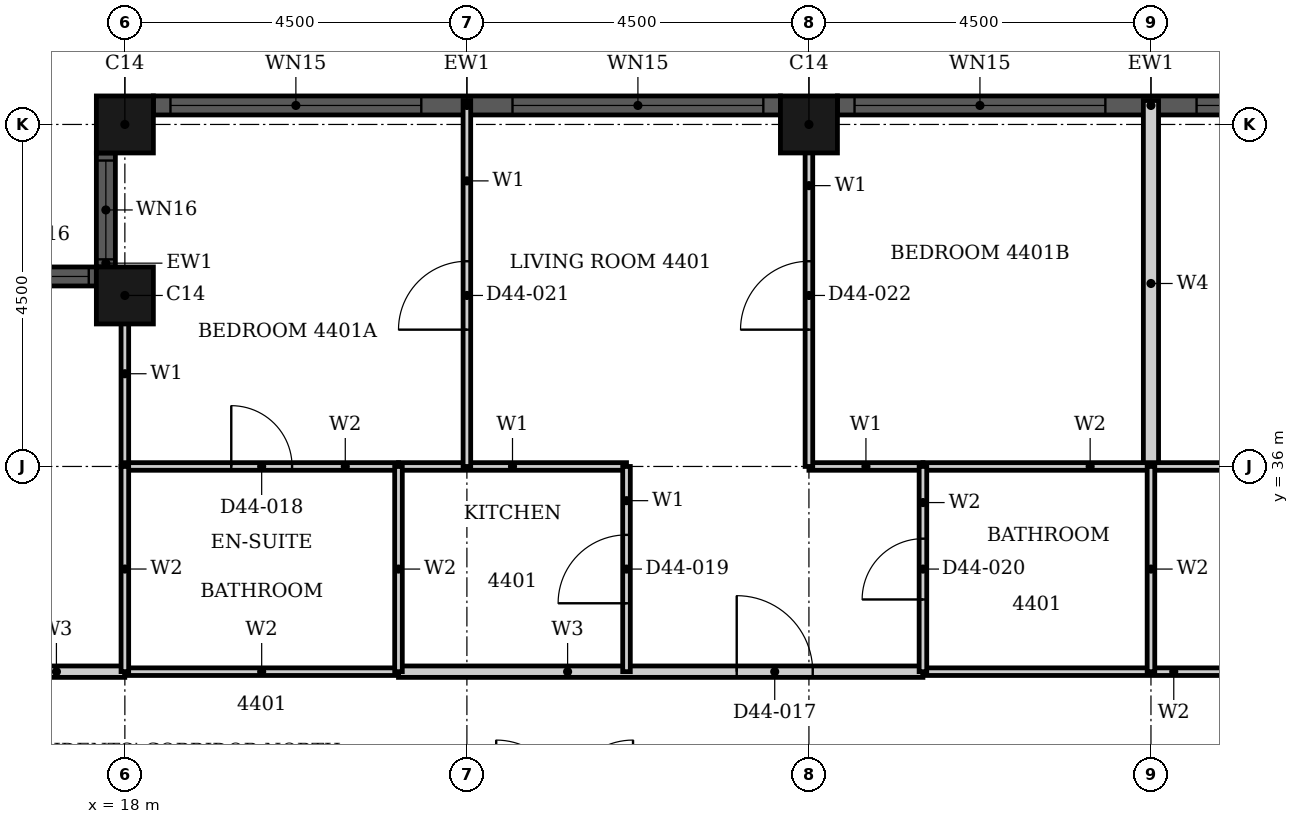
"""IFC4 building model, lengths in metres.
Left out: names, types, materials, properties, quantities, classifications, styles, units other than length and angle.
Written with IfcOpenShell. Run it as: python <this file> out.ifc"""

import sys

from ifc_helpers import new_model, si_unit, direction, frame, frame_2d, origin, origin_2d, place, context, subcontext, project, spatial, rectangle, hollow_rectangle, extrude, element, fill, save


model = new_model("IFC4")
c1 = context("Model", 3, precision=1e-05, world=origin(), true_north=direction((0.0, 1.0)))
c2 = subcontext(c1, "Body", "Model", "MODEL_VIEW")
j1 = project(units=[si_unit("LENGTHUNIT", "METRE"), si_unit("PLANEANGLEUNIT", "RADIAN")], contexts=[c1])
p1 = place(None, origin())
s1 = spatial("IfcSite", under=j1, at=p1, CompositionType="ELEMENT")
p2 = place(p1, origin())
s2 = spatial("IfcBuilding", under=s1, at=p2, CompositionType="ELEMENT")
p3 = place(p2, frame((0.0, 0.0, 176.5)))
s3 = spatial("IfcBuildingStorey", under=s2, at=p3, CompositionType="ELEMENT", Elevation=176.5)
for number, where, z_axis, x_axis in (
    (1, (27.0, 40.5, 0.0), (0.0, 0.0, 1.0), (1.0, 0.0, 0.0)),
    (2, (18.0, 40.5, 0.0), (0.0, 0.0, 1.0), (1.0, 0.0, 0.0)),
    (3, (18.0, 38.25, 0.0), (0.0, 0.0, 1.0), (1.0, 0.0, 0.0)),
):
    element("IfcColumn", number, at=place(p3, frame(where, z_axis=z_axis, x_axis=x_axis)), inside=s3, PredefinedType="COLUMN", context=c2, shape_type="SweptSolid", body=[
        extrude(hollow_rectangle(XDim=0.75, YDim=0.75, WallThickness=0.024, at=origin_2d()), origin(), (0.0, 0.0, 1.0), 3.7),
    ])
p4 = place(p3, frame((35.625, 40.75, 0.0), z_axis=(0.0, 0.0, 1.0), x_axis=(-1.0, 0.0, 0.0)))
e4 = element("IfcWall", 4, at=p4, inside=s3, PredefinedType="SOLIDWALL", context=c2, shape_type="SweptSolid", body=[
    extrude(rectangle(XDim=8.25, YDim=0.25, at=frame_2d((4.125, 0.0))), origin(), (0.0, 0.0, 1.0), 3.7),
])
p5 = place(p4, frame((0.225, 0.0, 0.45)))
e5 = element("IfcOpeningElement", 5, at=p5, cuts=e4, PredefinedType="OPENING", context=c2, shape_type="SweptSolid", body=[
    extrude(rectangle(XDim=3.3, YDim=2.3, at=frame_2d((1.65, 1.15))), frame((0.0, 0.135, 0.0), z_axis=(0.0, -1.0, 0.0), x_axis=(1.0, 0.0, 0.0)), (0.0, 0.0, 1.0), 0.27),
])
p6 = place(p4, frame((4.725, 0.0, 0.45)))
e6 = element("IfcOpeningElement", 6, at=p6, cuts=e4, PredefinedType="OPENING", context=c2, shape_type="SweptSolid", body=[
    extrude(rectangle(XDim=3.3, YDim=2.3, at=frame_2d((1.65, 1.15))), frame((0.0, 0.135, 0.0), z_axis=(0.0, -1.0, 0.0), x_axis=(1.0, 0.0, 0.0)), (0.0, 0.0, 1.0), 0.27),
])
p7 = place(p3, frame((26.625, 40.75, 0.0), z_axis=(0.0, 0.0, 1.0), x_axis=(-1.0, 0.0, 0.0)))
e7 = element("IfcWall", 7, at=p7, inside=s3, PredefinedType="SOLIDWALL", context=c2, shape_type="SweptSolid", body=[
    extrude(rectangle(XDim=8.25, YDim=0.25, at=frame_2d((4.125, 0.0))), origin(), (0.0, 0.0, 1.0), 3.7),
])
p8 = place(p7, frame((0.225, 0.0, 0.45)))
e8 = element("IfcOpeningElement", 8, at=p8, cuts=e7, PredefinedType="OPENING", context=c2, shape_type="SweptSolid", body=[
    extrude(rectangle(XDim=3.3, YDim=2.3, at=frame_2d((1.65, 1.15))), frame((0.0, 0.135, 0.0), z_axis=(0.0, -1.0, 0.0), x_axis=(1.0, 0.0, 0.0)), (0.0, 0.0, 1.0), 0.27),
])
p9 = place(p7, frame((4.725, 0.0, 0.45)))
e9 = element("IfcOpeningElement", 9, at=p9, cuts=e7, PredefinedType="OPENING", context=c2, shape_type="SweptSolid", body=[
    extrude(rectangle(XDim=3.3, YDim=2.3, at=frame_2d((1.65, 1.15))), frame((0.0, 0.135, 0.0), z_axis=(0.0, -1.0, 0.0), x_axis=(1.0, 0.0, 0.0)), (0.0, 0.0, 1.0), 0.27),
])
p10 = place(p3, frame((17.75, 40.125, 0.0), z_axis=(0.0, 0.0, 1.0), x_axis=(0.0, -1.0, 0.0)))
e10 = element("IfcWall", 10, at=p10, inside=s3, PredefinedType="SOLIDWALL", context=c2, shape_type="SweptSolid", body=[
    extrude(rectangle(XDim=1.5, YDim=0.25, at=frame_2d((0.75, 0.0))), origin(), (0.0, 0.0, 1.0), 3.7),
])
p11 = place(p10, frame((0.1, 0.0, 0.9)))
e11 = element("IfcOpeningElement", 11, at=p11, cuts=e10, PredefinedType="OPENING", context=c2, shape_type="SweptSolid", body=[
    extrude(rectangle(XDim=1.3, YDim=1.85, at=frame_2d((0.65, 0.925))), frame((0.0, 0.135, 0.0), z_axis=(0.0, -1.0, 0.0), x_axis=(1.0, 0.0, 0.0)), (0.0, 0.0, 1.0), 0.27),
])
p12 = place(p3, frame((17.625, 38.5, 0.0), z_axis=(0.0, 0.0, 1.0), x_axis=(-1.0, 0.0, 0.0)))
e12 = element("IfcWall", 12, at=p12, inside=s3, PredefinedType="SOLIDWALL", context=c2, shape_type="SweptSolid", body=[
    extrude(rectangle(XDim=1.5, YDim=0.25, at=frame_2d((0.75, 0.0))), origin(), (0.0, 0.0, 1.0), 3.7),
])
p13 = place(p12, frame((0.1, 0.0, 0.9)))
e13 = element("IfcOpeningElement", 13, at=p13, cuts=e12, PredefinedType="OPENING", context=c2, shape_type="SweptSolid", body=[
    extrude(rectangle(XDim=1.3, YDim=1.85, at=frame_2d((0.65, 0.925))), frame((0.0, 0.135, 0.0), z_axis=(0.0, -1.0, 0.0), x_axis=(1.0, 0.0, 0.0)), (0.0, 0.0, 1.0), 0.27),
])
p14 = place(p3, frame((21.6, 33.3, 0.0), z_axis=(0.0, 0.0, 1.0), x_axis=(1.0, 0.0, 0.0)))
e14 = element("IfcWall", 14, at=p14, inside=s3, PredefinedType="PARTITIONING", context=c2, shape_type="SweptSolid", body=[
    extrude(rectangle(XDim=6.9, YDim=0.15, at=frame_2d((3.45, 0.0))), origin(), (0.0, 0.0, 1.0), 3.4),
])
p15 = place(p14, frame((4.45, 0.0, 0.0)))
e15 = element("IfcOpeningElement", 15, at=p15, cuts=e14, PredefinedType="OPENING", context=c2, shape_type="SweptSolid", body=[
    extrude(rectangle(XDim=1.0, YDim=2.2, at=frame_2d((0.5, 1.1))), frame((0.0, 0.085, 0.0), z_axis=(0.0, -1.0, 0.0), x_axis=(1.0, 0.0, 0.0)), (0.0, 0.0, 1.0), 0.17),
])
p16 = place(p3, frame((16.2, 33.3, 0.0), z_axis=(0.0, 0.0, 1.0), x_axis=(1.0, 0.0, 0.0)))
e16 = element("IfcWall", 16, at=p16, inside=s3, PredefinedType="PARTITIONING", context=c2, shape_type="SweptSolid", body=[
    extrude(rectangle(XDim=1.799, YDim=0.15, at=frame_2d((0.899, 0.0))), origin(), (0.0, 0.0, 1.0), 3.4),
])
p17 = place(p3, frame((27.0, 36.0, 0.0), z_axis=(0.0, 0.0, 1.0), x_axis=(1.0, 0.0, 0.0)))
e17 = element("IfcWall", 17, at=p17, inside=s3, PredefinedType="PARTITIONING", context=c2, shape_type="SweptSolid", body=[
    extrude(rectangle(XDim=1.5, YDim=0.1, at=frame_2d((0.75, 0.0))), origin(), (0.0, 0.0, 1.0), 3.4),
])
p18 = place(p3, frame((21.6, 36.0, 0.0), z_axis=(0.0, 0.0, 1.0), x_axis=(1.0, 0.0, 0.0)))
e18 = element("IfcWall", 18, at=p18, inside=s3, PredefinedType="PARTITIONING", context=c2, shape_type="SweptSolid", body=[
    extrude(rectangle(XDim=3.0, YDim=0.1, at=frame_2d((1.5, 0.0))), origin(), (0.0, 0.0, 1.0), 3.4),
])
p19 = place(p3, frame((18.0, 36.0, 0.0), z_axis=(0.0, 0.0, 1.0), x_axis=(0.0, 1.0, 0.0)))
e19 = element("IfcWall", 19, at=p19, inside=s3, PredefinedType="PARTITIONING", context=c2, shape_type="SweptSolid", body=[
    extrude(rectangle(XDim=2.44, YDim=0.1, at=frame_2d((1.22, 0.0))), origin(), (0.0, 0.0, 1.0), 3.4),
])
p20 = place(p3, frame((22.5, 36.0, 0.0), z_axis=(0.0, 0.0, 1.0), x_axis=(0.0, 1.0, 0.0)))
e20 = element("IfcWall", 20, at=p20, inside=s3, PredefinedType="PARTITIONING", context=c2, shape_type="SweptSolid", body=[
    extrude(rectangle(XDim=4.815, YDim=0.1, at=frame_2d((2.407, 0.0))), origin(), (0.0, 0.0, 1.0), 3.4),
])
p21 = place(p20, frame((1.8, 0.0, 0.0)))
e21 = element("IfcOpeningElement", 21, at=p21, cuts=e20, PredefinedType="OPENING", context=c2, shape_type="SweptSolid", body=[
    extrude(rectangle(XDim=0.9, YDim=2.1, at=frame_2d((0.45, 1.05))), frame((0.0, 0.06, 0.0), z_axis=(0.0, -1.0, 0.0), x_axis=(1.0, 0.0, 0.0)), (0.0, 0.0, 1.0), 0.12),
])
p22 = place(p3, frame((24.6, 33.3, 0.0), z_axis=(0.0, 0.0, 1.0), x_axis=(0.0, 1.0, 0.0)))
e22 = element("IfcWall", 22, at=p22, inside=s3, PredefinedType="PARTITIONING", context=c2, shape_type="SweptSolid", body=[
    extrude(rectangle(XDim=2.7, YDim=0.1, at=frame_2d((1.35, 0.0))), origin(), (0.0, 0.0, 1.0), 3.4),
])
p23 = place(p22, frame((0.9, 0.0, 0.0)))
e23 = element("IfcOpeningElement", 23, at=p23, cuts=e22, PredefinedType="OPENING", context=c2, shape_type="SweptSolid", body=[
    extrude(rectangle(XDim=0.9, YDim=2.1, at=frame_2d((0.45, 1.05))), frame((0.0, 0.06, 0.0), z_axis=(0.0, -1.0, 0.0), x_axis=(1.0, 0.0, 0.0)), (0.0, 0.0, 1.0), 0.12),
])
p24 = place(p3, frame((27.0, 36.0, 0.0), z_axis=(0.0, 0.0, 1.0), x_axis=(0.0, 1.0, 0.0)))
e24 = element("IfcWall", 24, at=p24, inside=s3, PredefinedType="PARTITIONING", context=c2, shape_type="SweptSolid", body=[
    extrude(rectangle(XDim=4.69, YDim=0.1, at=frame_2d((2.345, 0.0))), origin(), (0.0, 0.0, 1.0), 3.4),
])
p25 = place(p24, frame((1.8, 0.0, 0.0)))
e25 = element("IfcOpeningElement", 25, at=p25, cuts=e24, PredefinedType="OPENING", context=c2, shape_type="SweptSolid", body=[
    extrude(rectangle(XDim=0.9, YDim=2.1, at=frame_2d((0.45, 1.05))), frame((0.0, 0.06, 0.0), z_axis=(0.0, -1.0, 0.0), x_axis=(1.0, 0.0, 0.0)), (0.0, 0.0, 1.0), 0.12),
])
p26 = place(p3, frame((31.5, 36.0, 0.0), z_axis=(0.0, 0.0, 1.0), x_axis=(0.0, 1.0, 0.0)))
e26 = element("IfcWall", 26, at=p26, inside=s3, PredefinedType="PARTITIONING", context=c2, shape_type="SweptSolid", body=[
    extrude(rectangle(XDim=4.815, YDim=0.2, at=frame_2d((2.407, 0.0))), origin(), (0.0, 0.0, 1.0), 3.4),
])
p27 = place(p3, frame((28.5, 33.3, 0.0), z_axis=(0.0, 0.0, 1.0), x_axis=(1.0, 0.0, 0.0)))
e27 = element("IfcWall", 27, at=p27, inside=s3, PredefinedType="PARTITIONING", context=c2, shape_type="SweptSolid", body=[
    extrude(rectangle(XDim=6.6, YDim=0.1, at=frame_2d((3.3, 0.0))), origin(), (0.0, 0.0, 1.0), 3.4),
])
p28 = place(p3, frame((18.0, 33.3, 0.0), z_axis=(0.0, 0.0, 1.0), x_axis=(1.0, 0.0, 0.0)))
e28 = element("IfcWall", 28, at=p28, inside=s3, PredefinedType="PARTITIONING", context=c2, shape_type="SweptSolid", body=[
    extrude(rectangle(XDim=3.6, YDim=0.1, at=frame_2d((1.8, 0.0))), origin(), (0.0, 0.0, 1.0), 3.4),
])
p29 = place(p3, frame((28.5, 36.0, 0.0), z_axis=(0.0, 0.0, 1.0), x_axis=(1.0, 0.0, 0.0)))
e29 = element("IfcWall", 29, at=p29, inside=s3, PredefinedType="PARTITIONING", context=c2, shape_type="SweptSolid", body=[
    extrude(rectangle(XDim=6.6, YDim=0.1, at=frame_2d((3.3, 0.0))), origin(), (0.0, 0.0, 1.0), 3.4),
])
p30 = place(p29, frame((4.4, 0.0, 0.0)))
e30 = element("IfcOpeningElement", 30, at=p30, cuts=e29, PredefinedType="OPENING", context=c2, shape_type="SweptSolid", body=[
    extrude(rectangle(XDim=0.8, YDim=2.1, at=frame_2d((0.4, 1.05))), frame((0.0, 0.06, 0.0), z_axis=(0.0, -1.0, 0.0), x_axis=(1.0, 0.0, 0.0)), (0.0, 0.0, 1.0), 0.12),
])
p31 = place(p3, frame((18.0, 36.0, 0.0), z_axis=(0.0, 0.0, 1.0), x_axis=(1.0, 0.0, 0.0)))
e31 = element("IfcWall", 31, at=p31, inside=s3, PredefinedType="PARTITIONING", context=c2, shape_type="SweptSolid", body=[
    extrude(rectangle(XDim=3.6, YDim=0.1, at=frame_2d((1.8, 0.0))), origin(), (0.0, 0.0, 1.0), 3.4),
])
p32 = place(p31, frame((1.4, 0.0, 0.0)))
e32 = element("IfcOpeningElement", 32, at=p32, cuts=e31, PredefinedType="OPENING", context=c2, shape_type="SweptSolid", body=[
    extrude(rectangle(XDim=0.8, YDim=2.1, at=frame_2d((0.4, 1.05))), frame((0.0, 0.06, 0.0), z_axis=(0.0, -1.0, 0.0), x_axis=(1.0, 0.0, 0.0)), (0.0, 0.0, 1.0), 0.12),
])
p33 = place(p3, frame((18.0, 33.301, 0.0), z_axis=(0.0, 0.0, 1.0), x_axis=(0.0, 1.0, 0.0)))
e33 = element("IfcWall", 33, at=p33, inside=s3, PredefinedType="PARTITIONING", context=c2, shape_type="SweptSolid", body=[
    extrude(rectangle(XDim=2.699, YDim=0.1, at=frame_2d((1.35, 0.0))), origin(), (0.0, 0.0, 1.0), 3.4),
])
p34 = place(p3, frame((21.6, 33.3, 0.0), z_axis=(0.0, 0.0, 1.0), x_axis=(0.0, 1.0, 0.0)))
e34 = element("IfcWall", 34, at=p34, inside=s3, PredefinedType="PARTITIONING", context=c2, shape_type="SweptSolid", body=[
    extrude(rectangle(XDim=2.7, YDim=0.1, at=frame_2d((1.35, 0.0))), origin(), (0.0, 0.0, 1.0), 3.4),
])
p35 = place(p3, frame((28.5, 33.3, 0.0), z_axis=(0.0, 0.0, 1.0), x_axis=(0.0, 1.0, 0.0)))
e35 = element("IfcWall", 35, at=p35, inside=s3, PredefinedType="PARTITIONING", context=c2, shape_type="SweptSolid", body=[
    extrude(rectangle(XDim=2.7, YDim=0.1, at=frame_2d((1.35, 0.0))), origin(), (0.0, 0.0, 1.0), 3.4),
])
p36 = place(p35, frame((0.95, 0.0, 0.0)))
e36 = element("IfcOpeningElement", 36, at=p36, cuts=e35, PredefinedType="OPENING", context=c2, shape_type="SweptSolid", body=[
    extrude(rectangle(XDim=0.8, YDim=2.1, at=frame_2d((0.4, 1.05))), frame((0.0, 0.06, 0.0), z_axis=(0.0, -1.0, 0.0), x_axis=(1.0, 0.0, 0.0)), (0.0, 0.0, 1.0), 0.12),
])
p37 = place(p3, frame((31.5, 33.3, 0.0), z_axis=(0.0, 0.0, 1.0), x_axis=(0.0, 1.0, 0.0)))
e37 = element("IfcWall", 37, at=p37, inside=s3, PredefinedType="PARTITIONING", context=c2, shape_type="SweptSolid", body=[
    extrude(rectangle(XDim=2.7, YDim=0.1, at=frame_2d((1.35, 0.0))), origin(), (0.0, 0.0, 1.0), 3.4),
])
p38 = place(p5, origin())
e38 = element("IfcWindow", 38, at=p38, inside=s3, PartitioningType="SINGLE_PANEL", PredefinedType="WINDOW", context=c2, shape_type="SweptSolid", body=[
    extrude(rectangle(XDim=3.3, YDim=2.3, at=frame_2d((1.65, 1.15))), frame((0.0, 0.03, 0.0), z_axis=(0.0, -1.0, 0.0), x_axis=(1.0, 0.0, 0.0)), (0.0, 0.0, 1.0), 0.06),
])
fill(e5, e38)
p39 = place(p6, origin())
e39 = element("IfcWindow", 39, at=p39, inside=s3, PartitioningType="SINGLE_PANEL", PredefinedType="WINDOW", context=c2, shape_type="SweptSolid", body=[
    extrude(rectangle(XDim=3.3, YDim=2.3, at=frame_2d((1.65, 1.15))), frame((0.0, 0.03, 0.0), z_axis=(0.0, -1.0, 0.0), x_axis=(1.0, 0.0, 0.0)), (0.0, 0.0, 1.0), 0.06),
])
fill(e6, e39)
p40 = place(p8, origin())
e40 = element("IfcWindow", 40, at=p40, inside=s3, PartitioningType="SINGLE_PANEL", PredefinedType="WINDOW", context=c2, shape_type="SweptSolid", body=[
    extrude(rectangle(XDim=3.3, YDim=2.3, at=frame_2d((1.65, 1.15))), frame((0.0, 0.03, 0.0), z_axis=(0.0, -1.0, 0.0), x_axis=(1.0, 0.0, 0.0)), (0.0, 0.0, 1.0), 0.06),
])
fill(e8, e40)
p41 = place(p9, origin())
e41 = element("IfcWindow", 41, at=p41, inside=s3, PartitioningType="SINGLE_PANEL", PredefinedType="WINDOW", context=c2, shape_type="SweptSolid", body=[
    extrude(rectangle(XDim=3.3, YDim=2.3, at=frame_2d((1.65, 1.15))), frame((0.0, 0.03, 0.0), z_axis=(0.0, -1.0, 0.0), x_axis=(1.0, 0.0, 0.0)), (0.0, 0.0, 1.0), 0.06),
])
fill(e9, e41)
p42 = place(p11, origin())
e42 = element("IfcWindow", 42, at=p42, inside=s3, PartitioningType="SINGLE_PANEL", PredefinedType="WINDOW", context=c2, shape_type="SweptSolid", body=[
    extrude(rectangle(XDim=1.3, YDim=1.85, at=frame_2d((0.65, 0.925))), frame((0.0, 0.03, 0.0), z_axis=(0.0, -1.0, 0.0), x_axis=(1.0, 0.0, 0.0)), (0.0, 0.0, 1.0), 0.06),
])
fill(e11, e42)
p43 = place(p13, origin())
e43 = element("IfcWindow", 43, at=p43, inside=s3, PartitioningType="SINGLE_PANEL", PredefinedType="WINDOW", context=c2, shape_type="SweptSolid", body=[
    extrude(rectangle(XDim=1.3, YDim=1.85, at=frame_2d((0.65, 0.925))), frame((0.0, 0.03, 0.0), z_axis=(0.0, -1.0, 0.0), x_axis=(1.0, 0.0, 0.0)), (0.0, 0.0, 1.0), 0.06),
])
fill(e13, e43)
p44 = place(p15, origin())
e44 = element("IfcDoor", 44, at=p44, inside=s3, OperationType="SINGLE_SWING_RIGHT", PredefinedType="DOOR", context=c2, shape_type="SweptSolid", body=[
    extrude(rectangle(XDim=1.0, YDim=2.2, at=frame_2d((0.5, 1.1))), frame((0.0, 0.025, 0.0), z_axis=(0.0, -1.0, 0.0), x_axis=(1.0, 0.0, 0.0)), (0.0, 0.0, 1.0), 0.05),
])
fill(e15, e44)
p45 = place(p32, origin())
e45 = element("IfcDoor", 45, at=p45, inside=s3, OperationType="SINGLE_SWING_LEFT", PredefinedType="DOOR", context=c2, shape_type="SweptSolid", body=[
    extrude(rectangle(XDim=0.8, YDim=2.1, at=frame_2d((0.4, 1.05))), frame((0.0, 0.025, 0.0), z_axis=(0.0, -1.0, 0.0), x_axis=(1.0, 0.0, 0.0)), (0.0, 0.0, 1.0), 0.05),
])
fill(e32, e45)
p46 = place(p23, origin())
e46 = element("IfcDoor", 46, at=p46, inside=s3, OperationType="SINGLE_SWING_RIGHT", PredefinedType="DOOR", context=c2, shape_type="SweptSolid", body=[
    extrude(rectangle(XDim=0.9, YDim=2.1, at=frame_2d((0.45, 1.05))), frame((0.0, 0.025, 0.0), z_axis=(0.0, -1.0, 0.0), x_axis=(1.0, 0.0, 0.0)), (0.0, 0.0, 1.0), 0.05),
])
fill(e23, e46)
p47 = place(p36, origin())
e47 = element("IfcDoor", 47, at=p47, inside=s3, OperationType="SINGLE_SWING_LEFT", PredefinedType="DOOR", context=c2, shape_type="SweptSolid", body=[
    extrude(rectangle(XDim=0.8, YDim=2.1, at=frame_2d((0.4, 1.05))), frame((0.0, 0.025, 0.0), z_axis=(0.0, -1.0, 0.0), x_axis=(1.0, 0.0, 0.0)), (0.0, 0.0, 1.0), 0.05),
])
fill(e36, e47)
p48 = place(p21, origin())
e48 = element("IfcDoor", 48, at=p48, inside=s3, OperationType="SINGLE_SWING_LEFT", PredefinedType="DOOR", context=c2, shape_type="SweptSolid", body=[
    extrude(rectangle(XDim=0.9, YDim=2.1, at=frame_2d((0.45, 1.05))), frame((0.0, 0.025, 0.0), z_axis=(0.0, -1.0, 0.0), x_axis=(1.0, 0.0, 0.0)), (0.0, 0.0, 1.0), 0.05),
])
fill(e21, e48)
p49 = place(p25, origin())
e49 = element("IfcDoor", 49, at=p49, inside=s3, OperationType="SINGLE_SWING_LEFT", PredefinedType="DOOR", context=c2, shape_type="SweptSolid", body=[
    extrude(rectangle(XDim=0.9, YDim=2.1, at=frame_2d((0.45, 1.05))), frame((0.0, 0.025, 0.0), z_axis=(0.0, -1.0, 0.0), x_axis=(1.0, 0.0, 0.0)), (0.0, 0.0, 1.0), 0.05),
])
fill(e25, e49)
save(model, sys.argv[1])
